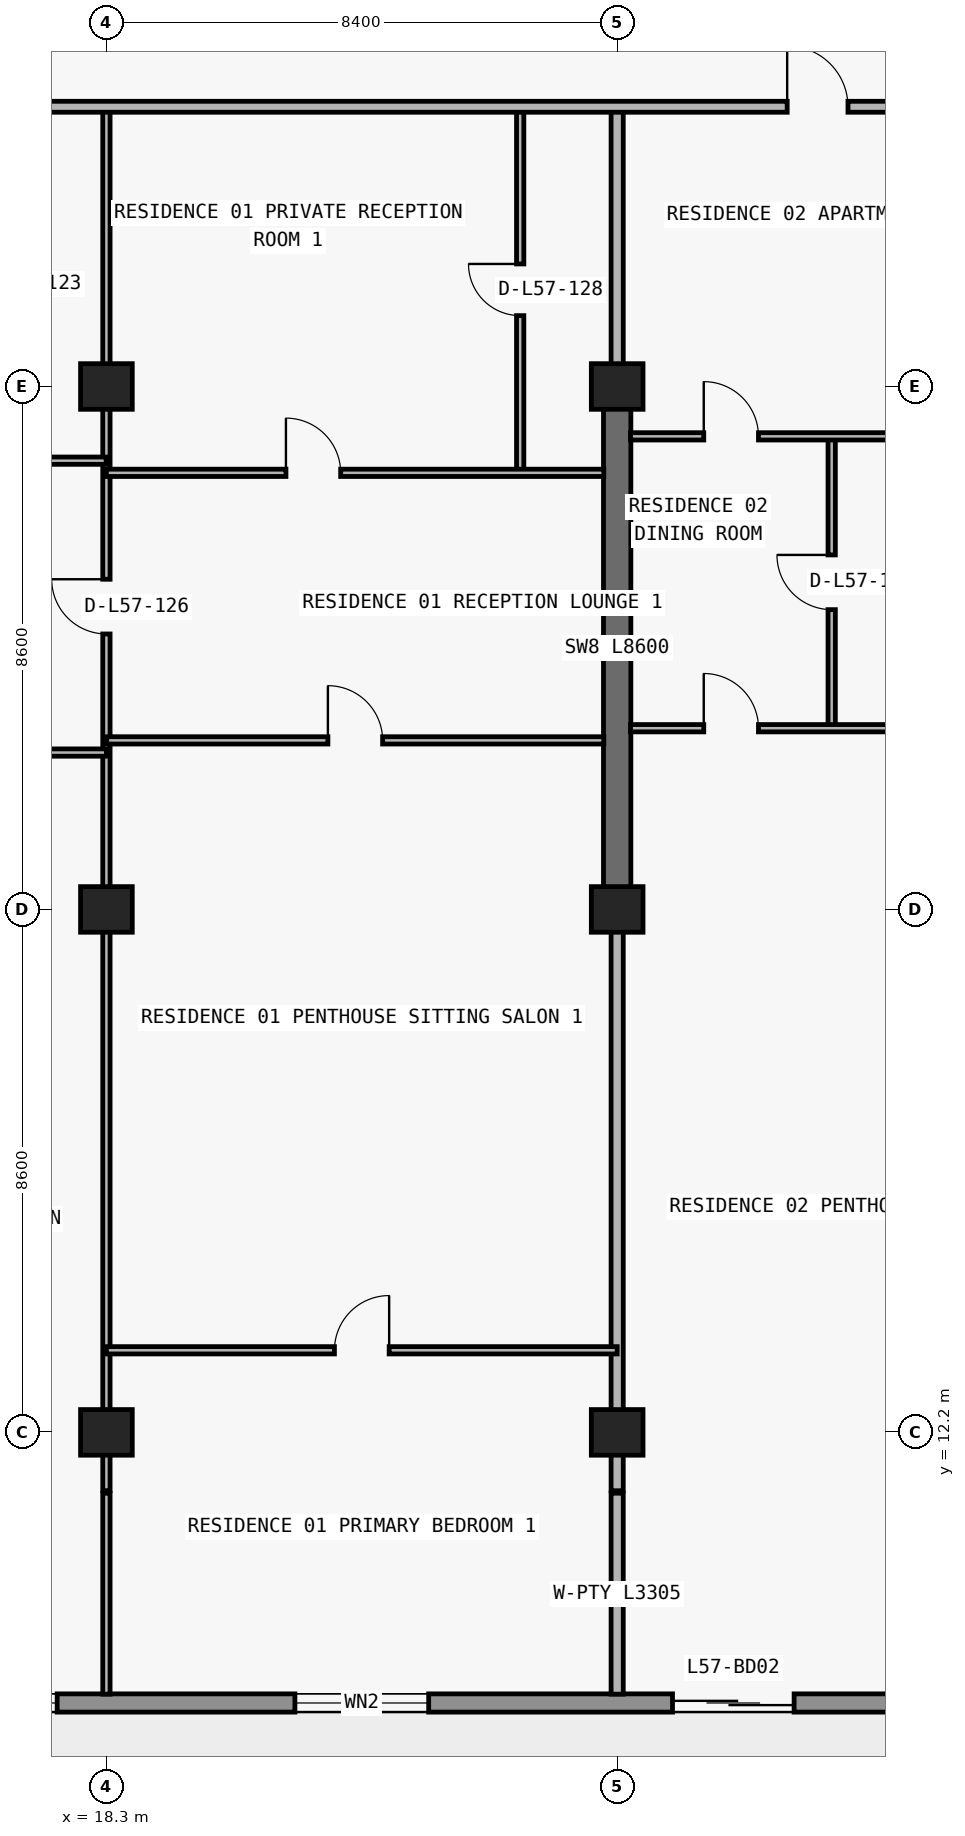
"""IFC4 building model, lengths in metres.
Left out: names, types, materials, properties, quantities, classifications, styles, units other than length and angle.
Written with IfcOpenShell. Run it as: python <this file> out.ifc"""

import sys

from ifc_helpers import new_model, si_unit, direction, frame, frame_2d, origin, origin_2d, place, context, subcontext, project, spatial, rectangle, extrude, element, fill, save


model = new_model("IFC4")
c1 = context("Model", 3, precision=1e-05, world=origin(), true_north=direction((0.0, 1.0)))
c2 = subcontext(c1, "Body", "Model", "MODEL_VIEW")
j1 = project(units=[si_unit("LENGTHUNIT", "METRE"), si_unit("PLANEANGLEUNIT", "RADIAN")], contexts=[c1])
p1 = place(None, origin())
s1 = spatial("IfcSite", under=j1, at=p1, CompositionType="ELEMENT")
p2 = place(p1, origin())
s2 = spatial("IfcBuilding", under=s1, at=p2, CompositionType="ELEMENT")
p3 = place(p2, frame((0.0, 0.0, 204.9)))
s3 = spatial("IfcBuildingStorey", under=s2, at=p3, CompositionType="ELEMENT", Elevation=204.9)
for number, where, z_axis, x_axis in (
    (1, (18.3, 12.2, 0.0), (0.0, 0.0, 1.0), (1.0, 0.0, 0.0)),
    (2, (26.7, 12.2, 0.0), (0.0, 0.0, 1.0), (1.0, 0.0, 0.0)),
    (3, (18.3, 20.8, 0.0), (0.0, 0.0, 1.0), (1.0, 0.0, 0.0)),
    (4, (26.7, 20.8, 0.0), (0.0, 0.0, 1.0), (1.0, 0.0, 0.0)),
    (5, (18.3, 29.4, 0.0), (0.0, 0.0, 1.0), (1.0, 0.0, 0.0)),
    (6, (26.7, 29.4, 0.0), (0.0, 0.0, 1.0), (1.0, 0.0, 0.0)),
):
    element("IfcColumn", number, at=place(p3, frame(where, z_axis=z_axis, x_axis=x_axis)), inside=s3, PredefinedType="COLUMN", context=c2, shape_type="SweptSolid", body=[
        extrude(rectangle(XDim=0.85, YDim=0.75, at=origin_2d()), origin(), (0.0, 0.0, 1.0), 3.05),
    ])
p4 = place(p3, frame((26.7, 20.8, 0.0), z_axis=(0.0, 0.0, 1.0), x_axis=(0.0, 1.0, 0.0)))
e7 = element("IfcWall", 7, at=p4, inside=s3, PredefinedType="SHEAR", context=c2, shape_type="SweptSolid", body=[
    extrude(rectangle(XDim=8.6, YDim=0.45, at=frame_2d((4.3, 0.0))), origin(), (0.0, 0.0, 1.0), 3.05),
])
p5 = place(p3, frame((67.7, 7.75, 0.0), z_axis=(0.0, 0.0, 1.0), x_axis=(-1.0, 0.0, 0.0)))
e8 = element("IfcWall", 8, at=p5, inside=s3, PredefinedType="STANDARD", context=c2, shape_type="SweptSolid", body=[
    extrude(rectangle(XDim=57.6, YDim=0.3, at=frame_2d((28.8, 0.0))), origin(), (0.0, 0.0, 1.0), 3.05),
])
p6 = place(p5, frame((54.69, 0.0, 0.0)))
e9 = element("IfcOpeningElement", 9, at=p6, cuts=e8, PredefinedType="OPENING", context=c2, shape_type="SweptSolid", body=[
    extrude(rectangle(XDim=2.0, YDim=2.3, at=frame_2d((1.0, 1.15))), frame((0.0, 0.16, 0.0), z_axis=(0.0, -1.0, 0.0), x_axis=(1.0, 0.0, 0.0)), (0.0, 0.0, 1.0), 0.32),
])
p7 = place(p5, frame((50.21, 0.0, 0.65)))
e10 = element("IfcOpeningElement", 10, at=p7, cuts=e8, PredefinedType="OPENING", context=c2, shape_type="SweptSolid", body=[
    extrude(rectangle(XDim=2.6, YDim=1.85, at=frame_2d((1.3, 0.925))), frame((0.0, 0.16, 0.0), z_axis=(0.0, -1.0, 0.0), x_axis=(1.0, 0.0, 0.0)), (0.0, 0.0, 1.0), 0.32),
])
p8 = place(p5, frame((44.1, 0.0, 0.85)))
e11 = element("IfcOpeningElement", 11, at=p8, cuts=e8, PredefinedType="OPENING", context=c2, shape_type="SweptSolid", body=[
    extrude(rectangle(XDim=2.2, YDim=1.55, at=frame_2d((1.1, 0.775))), frame((0.0, 0.16, 0.0), z_axis=(0.0, -1.0, 0.0), x_axis=(1.0, 0.0, 0.0)), (0.0, 0.0, 1.0), 0.32),
])
p9 = place(p5, frame((38.09, 0.0, 0.0)))
e12 = element("IfcOpeningElement", 12, at=p9, cuts=e8, PredefinedType="OPENING", context=c2, shape_type="SweptSolid", body=[
    extrude(rectangle(XDim=2.0, YDim=2.3, at=frame_2d((1.0, 1.15))), frame((0.0, 0.16, 0.0), z_axis=(0.0, -1.0, 0.0), x_axis=(1.0, 0.0, 0.0)), (0.0, 0.0, 1.0), 0.32),
])
p10 = place(p5, frame((33.41, 0.0, 0.65)))
e13 = element("IfcOpeningElement", 13, at=p10, cuts=e8, PredefinedType="OPENING", context=c2, shape_type="SweptSolid", body=[
    extrude(rectangle(XDim=2.6, YDim=1.85, at=frame_2d((1.3, 0.925))), frame((0.0, 0.16, 0.0), z_axis=(0.0, -1.0, 0.0), x_axis=(1.0, 0.0, 0.0)), (0.0, 0.0, 1.0), 0.32),
])
p11 = place(p5, frame((27.7, 0.0, 0.85)))
e14 = element("IfcOpeningElement", 14, at=p11, cuts=e8, PredefinedType="OPENING", context=c2, shape_type="SweptSolid", body=[
    extrude(rectangle(XDim=2.2, YDim=1.55, at=frame_2d((1.1, 0.775))), frame((0.0, 0.16, 0.0), z_axis=(0.0, -1.0, 0.0), x_axis=(1.0, 0.0, 0.0)), (0.0, 0.0, 1.0), 0.32),
])
p12 = place(p5, frame((19.7, 0.0, 0.85)))
e15 = element("IfcOpeningElement", 15, at=p12, cuts=e8, PredefinedType="OPENING", context=c2, shape_type="SweptSolid", body=[
    extrude(rectangle(XDim=2.2, YDim=1.55, at=frame_2d((1.1, 0.775))), frame((0.0, 0.16, 0.0), z_axis=(0.0, -1.0, 0.0), x_axis=(1.0, 0.0, 0.0)), (0.0, 0.0, 1.0), 0.32),
])
p13 = place(p5, frame((13.69, 0.0, 0.0)))
e16 = element("IfcOpeningElement", 16, at=p13, cuts=e8, PredefinedType="OPENING", context=c2, shape_type="SweptSolid", body=[
    extrude(rectangle(XDim=2.0, YDim=2.3, at=frame_2d((1.0, 1.15))), frame((0.0, 0.16, 0.0), z_axis=(0.0, -1.0, 0.0), x_axis=(1.0, 0.0, 0.0)), (0.0, 0.0, 1.0), 0.32),
])
p14 = place(p5, frame((9.01, 0.0, 0.65)))
e17 = element("IfcOpeningElement", 17, at=p14, cuts=e8, PredefinedType="OPENING", context=c2, shape_type="SweptSolid", body=[
    extrude(rectangle(XDim=2.6, YDim=1.85, at=frame_2d((1.3, 0.925))), frame((0.0, 0.16, 0.0), z_axis=(0.0, -1.0, 0.0), x_axis=(1.0, 0.0, 0.0)), (0.0, 0.0, 1.0), 0.32),
])
p15 = place(p5, frame((3.0, 0.0, 0.85)))
e18 = element("IfcOpeningElement", 18, at=p15, cuts=e8, PredefinedType="OPENING", context=c2, shape_type="SweptSolid", body=[
    extrude(rectangle(XDim=2.2, YDim=1.55, at=frame_2d((1.1, 0.775))), frame((0.0, 0.16, 0.0), z_axis=(0.0, -1.0, 0.0), x_axis=(1.0, 0.0, 0.0)), (0.0, 0.0, 1.0), 0.32),
])
p16 = place(p3, frame((18.3, 7.895, 0.0), z_axis=(0.0, 0.0, 1.0), x_axis=(0.0, 1.0, 0.0)))
e19 = element("IfcWall", 19, at=p16, inside=s3, PredefinedType="PARTITIONING", context=c2, shape_type="SweptSolid", body=[
    extrude(rectangle(XDim=3.305, YDim=0.12, at=frame_2d((1.652, 0.0))), origin(), (0.0, 0.0, 1.0), 3.05),
])
p17 = place(p3, frame((18.3, 11.24, 0.0), z_axis=(0.0, 0.0, 1.0), x_axis=(0.0, 1.0, 0.0)))
e20 = element("IfcWall", 20, at=p17, inside=s3, PredefinedType="PARTITIONING", context=c2, shape_type="SweptSolid", body=[
    extrude(rectangle(XDim=22.76, YDim=0.12, at=frame_2d((11.38, 0.0))), origin(), (0.0, 0.0, 1.0), 2.263),
])
p18 = place(p17, frame((14.09, 0.0, 0.0)))
e21 = element("IfcOpeningElement", 21, at=p18, cuts=e20, PredefinedType="OPENING", context=c2, shape_type="SweptSolid", body=[
    extrude(rectangle(XDim=0.9, YDim=2.15, at=frame_2d((0.45, 1.075))), frame((0.0, 0.07, 0.0), z_axis=(0.0, -1.0, 0.0), x_axis=(1.0, 0.0, 0.0)), (0.0, 0.0, 1.0), 0.14),
])
p19 = place(p3, frame((25.105, 27.98, 0.0), z_axis=(0.0, 0.0, 1.0), x_axis=(0.0, 1.0, 0.0)))
e22 = element("IfcWall", 22, at=p19, inside=s3, PredefinedType="PARTITIONING", context=c2, shape_type="SweptSolid", body=[
    extrude(rectangle(XDim=6.02, YDim=0.12, at=frame_2d((3.01, 0.0))), origin(), (0.0, 0.0, 1.0), 3.05),
])
p20 = place(p19, frame((2.585, 0.0, 0.0)))
e23 = element("IfcOpeningElement", 23, at=p20, cuts=e22, PredefinedType="OPENING", context=c2, shape_type="SweptSolid", body=[
    extrude(rectangle(XDim=0.85, YDim=2.1, at=frame_2d((0.425, 1.05))), frame((0.0, 0.07, 0.0), z_axis=(0.0, -1.0, 0.0), x_axis=(1.0, 0.0, 0.0)), (0.0, 0.0, 1.0), 0.14),
])
p21 = place(p3, frame((26.7, 7.895, 0.0), z_axis=(0.0, 0.0, 1.0), x_axis=(0.0, 1.0, 0.0)))
e24 = element("IfcWall", 24, at=p21, inside=s3, PredefinedType="PARTITIONING", context=c2, shape_type="SweptSolid", body=[
    extrude(rectangle(XDim=3.305, YDim=0.2, at=frame_2d((1.652, 0.0))), origin(), (0.0, 0.0, 1.0), 3.05),
])
p22 = place(p3, frame((26.7, 11.24, 0.0), z_axis=(0.0, 0.0, 1.0), x_axis=(0.0, 1.0, 0.0)))
e25 = element("IfcWall", 25, at=p22, inside=s3, PredefinedType="PARTITIONING", context=c2, shape_type="SweptSolid", body=[
    extrude(rectangle(XDim=9.555, YDim=0.2, at=frame_2d((4.777, 0.0))), origin(), (0.0, 0.0, 1.0), 2.263),
])
p23 = place(p3, frame((26.7, 29.405, 0.0), z_axis=(0.0, 0.0, 1.0), x_axis=(0.0, 1.0, 0.0)))
e26 = element("IfcWall", 26, at=p23, inside=s3, PredefinedType="PARTITIONING", context=c2, shape_type="SweptSolid", body=[
    extrude(rectangle(XDim=4.595, YDim=0.2, at=frame_2d((2.297, 0.0))), origin(), (0.0, 0.0, 1.0), 2.335),
])
p24 = place(p3, frame((30.228, 23.78, 0.0), z_axis=(0.0, 0.0, 1.0), x_axis=(0.0, 1.0, 0.0)))
e27 = element("IfcWall", 27, at=p24, inside=s3, PredefinedType="PARTITIONING", context=c2, shape_type="SweptSolid", body=[
    extrude(rectangle(XDim=4.8, YDim=0.12, at=frame_2d((2.4, 0.0))), origin(), (0.0, 0.0, 1.0), 3.05),
])
p25 = place(p24, frame((1.95, 0.0, 0.0)))
e28 = element("IfcOpeningElement", 28, at=p25, cuts=e27, PredefinedType="OPENING", context=c2, shape_type="SweptSolid", body=[
    extrude(rectangle(XDim=0.9, YDim=2.15, at=frame_2d((0.45, 1.075))), frame((0.0, 0.07, 0.0), z_axis=(0.0, -1.0, 0.0), x_axis=(1.0, 0.0, 0.0)), (0.0, 0.0, 1.0), 0.14),
])
p26 = place(p3, frame((18.3, 13.55, 0.0), z_axis=(0.0, 0.0, 1.0), x_axis=(1.0, 0.0, 0.0)))
e29 = element("IfcWall", 29, at=p26, inside=s3, PredefinedType="PARTITIONING", context=c2, shape_type="SweptSolid", body=[
    extrude(rectangle(XDim=8.4, YDim=0.12, at=frame_2d((4.2, 0.0))), origin(), (0.0, 0.0, 1.0), 3.05),
])
p27 = place(p26, frame((3.75, 0.0, 0.0)))
e30 = element("IfcOpeningElement", 30, at=p27, cuts=e29, PredefinedType="OPENING", context=c2, shape_type="SweptSolid", body=[
    extrude(rectangle(XDim=0.9, YDim=2.15, at=frame_2d((0.45, 1.075))), frame((0.0, 0.07, 0.0), z_axis=(0.0, -1.0, 0.0), x_axis=(1.0, 0.0, 0.0)), (0.0, 0.0, 1.0), 0.14),
])
p28 = place(p3, frame((10.1, 23.38, 0.0), z_axis=(0.0, 0.0, 1.0), x_axis=(1.0, 0.0, 0.0)))
e31 = element("IfcWall", 31, at=p28, inside=s3, PredefinedType="PARTITIONING", context=c2, shape_type="SweptSolid", body=[
    extrude(rectangle(XDim=8.2, YDim=0.12, at=frame_2d((4.1, 0.0))), origin(), (0.0, 0.0, 1.0), 3.05),
])
p29 = place(p28, frame((3.65, 0.0, 0.0)))
e32 = element("IfcOpeningElement", 32, at=p29, cuts=e31, PredefinedType="OPENING", context=c2, shape_type="SweptSolid", body=[
    extrude(rectangle(XDim=0.9, YDim=2.15, at=frame_2d((0.45, 1.075))), frame((0.0, 0.07, 0.0), z_axis=(0.0, -1.0, 0.0), x_axis=(1.0, 0.0, 0.0)), (0.0, 0.0, 1.0), 0.14),
])
p30 = place(p3, frame((18.305, 23.58, 0.0), z_axis=(0.0, 0.0, 1.0), x_axis=(1.0, 0.0, 0.0)))
e33 = element("IfcWall", 33, at=p30, inside=s3, PredefinedType="PARTITIONING", context=c2, shape_type="SweptSolid", body=[
    extrude(rectangle(XDim=8.175, YDim=0.12, at=frame_2d((4.087, 0.0))), origin(), (0.0, 0.0, 1.0), 3.05),
])
p31 = place(p30, frame((3.637, 0.0, 0.0)))
e34 = element("IfcOpeningElement", 34, at=p31, cuts=e33, PredefinedType="OPENING", context=c2, shape_type="SweptSolid", body=[
    extrude(rectangle(XDim=0.9, YDim=2.15, at=frame_2d((0.45, 1.075))), frame((0.0, 0.07, 0.0), z_axis=(0.0, -1.0, 0.0), x_axis=(1.0, 0.0, 0.0)), (0.0, 0.0, 1.0), 0.14),
])
p32 = place(p3, frame((26.92, 23.78, 0.0), z_axis=(0.0, 0.0, 1.0), x_axis=(1.0, 0.0, 0.0)))
e35 = element("IfcWall", 35, at=p32, inside=s3, PredefinedType="PARTITIONING", context=c2, shape_type="SweptSolid", body=[
    extrude(rectangle(XDim=8.18, YDim=0.12, at=frame_2d((4.09, 0.0))), origin(), (0.0, 0.0, 1.0), 3.05),
])
p33 = place(p32, frame((1.204, 0.0, 0.0)))
e36 = element("IfcOpeningElement", 36, at=p33, cuts=e35, PredefinedType="OPENING", context=c2, shape_type="SweptSolid", body=[
    extrude(rectangle(XDim=0.9, YDim=2.15, at=frame_2d((0.45, 1.075))), frame((0.0, 0.07, 0.0), z_axis=(0.0, -1.0, 0.0), x_axis=(1.0, 0.0, 0.0)), (0.0, 0.0, 1.0), 0.14),
])
p34 = place(p3, frame((18.3, 27.98, 0.0), z_axis=(0.0, 0.0, 1.0), x_axis=(1.0, 0.0, 0.0)))
e37 = element("IfcWall", 37, at=p34, inside=s3, PredefinedType="PARTITIONING", context=c2, shape_type="SweptSolid", body=[
    extrude(rectangle(XDim=8.18, YDim=0.12, at=frame_2d((4.09, 0.0))), origin(), (0.0, 0.0, 1.0), 3.05),
])
p35 = place(p34, frame((2.952, 0.0, 0.0)))
e38 = element("IfcOpeningElement", 38, at=p35, cuts=e37, PredefinedType="OPENING", context=c2, shape_type="SweptSolid", body=[
    extrude(rectangle(XDim=0.9, YDim=2.15, at=frame_2d((0.45, 1.075))), frame((0.0, 0.07, 0.0), z_axis=(0.0, -1.0, 0.0), x_axis=(1.0, 0.0, 0.0)), (0.0, 0.0, 1.0), 0.14),
])
p36 = place(p3, frame((10.1, 28.18, 0.0), z_axis=(0.0, 0.0, 1.0), x_axis=(1.0, 0.0, 0.0)))
e39 = element("IfcWall", 39, at=p36, inside=s3, PredefinedType="PARTITIONING", context=c2, shape_type="SweptSolid", body=[
    extrude(rectangle(XDim=8.195, YDim=0.12, at=frame_2d((4.097, 0.0))), origin(), (0.0, 0.0, 1.0), 3.05),
])
p37 = place(p36, frame((2.765, 0.0, 0.0)))
e40 = element("IfcOpeningElement", 40, at=p37, cuts=e39, PredefinedType="OPENING", context=c2, shape_type="SweptSolid", body=[
    extrude(rectangle(XDim=0.9, YDim=2.15, at=frame_2d((0.45, 1.075))), frame((0.0, 0.07, 0.0), z_axis=(0.0, -1.0, 0.0), x_axis=(1.0, 0.0, 0.0)), (0.0, 0.0, 1.0), 0.14),
])
p38 = place(p3, frame((26.92, 28.58, 0.0), z_axis=(0.0, 0.0, 1.0), x_axis=(1.0, 0.0, 0.0)))
e41 = element("IfcWall", 41, at=p38, inside=s3, PredefinedType="PARTITIONING", context=c2, shape_type="SweptSolid", body=[
    extrude(rectangle(XDim=8.175, YDim=0.12, at=frame_2d((4.087, 0.0))), origin(), (0.0, 0.0, 1.0), 3.05),
])
p39 = place(p38, frame((1.204, 0.0, 0.0)))
e42 = element("IfcOpeningElement", 42, at=p39, cuts=e41, PredefinedType="OPENING", context=c2, shape_type="SweptSolid", body=[
    extrude(rectangle(XDim=0.9, YDim=2.15, at=frame_2d((0.45, 1.075))), frame((0.0, 0.07, 0.0), z_axis=(0.0, -1.0, 0.0), x_axis=(1.0, 0.0, 0.0)), (0.0, 0.0, 1.0), 0.14),
])
p40 = place(p3, frame((10.105, 34.0, 0.0), z_axis=(0.0, 0.0, 1.0), x_axis=(1.0, 0.0, 0.0)))
e43 = element("IfcWall", 43, at=p40, inside=s3, PredefinedType="PARTITIONING", context=c2, shape_type="SweptSolid", body=[
    extrude(rectangle(XDim=57.595, YDim=0.18, at=frame_2d((28.797, 0.0))), origin(), (0.0, 0.0, 1.0), 3.05),
])
p41 = place(p40, frame((2.712, 0.0, 0.0)))
e44 = element("IfcOpeningElement", 44, at=p41, cuts=e43, PredefinedType="OPENING", context=c2, shape_type="SweptSolid", body=[
    extrude(rectangle(XDim=1.0, YDim=2.2, at=frame_2d((0.5, 1.1))), frame((0.0, 0.1, 0.0), z_axis=(0.0, -1.0, 0.0), x_axis=(1.0, 0.0, 0.0)), (0.0, 0.0, 1.0), 0.2),
])
p42 = place(p40, frame((19.391, 0.0, 0.0)))
e45 = element("IfcOpeningElement", 45, at=p42, cuts=e43, PredefinedType="OPENING", context=c2, shape_type="SweptSolid", body=[
    extrude(rectangle(XDim=1.0, YDim=2.2, at=frame_2d((0.5, 1.1))), frame((0.0, 0.1, 0.0), z_axis=(0.0, -1.0, 0.0), x_axis=(1.0, 0.0, 0.0)), (0.0, 0.0, 1.0), 0.2),
])
p43 = place(p40, frame((43.794, 0.0, 0.0)))
e46 = element("IfcOpeningElement", 46, at=p43, cuts=e43, PredefinedType="OPENING", context=c2, shape_type="SweptSolid", body=[
    extrude(rectangle(XDim=1.0, YDim=2.2, at=frame_2d((0.5, 1.1))), frame((0.0, 0.1, 0.0), z_axis=(0.0, -1.0, 0.0), x_axis=(1.0, 0.0, 0.0)), (0.0, 0.0, 1.0), 0.2),
])
p44 = place(p7, origin())
e47 = element("IfcWindow", 47, at=p44, inside=s3, PartitioningType="SINGLE_PANEL", PredefinedType="WINDOW", context=c2, shape_type="SweptSolid", body=[
    extrude(rectangle(XDim=2.6, YDim=1.85, at=frame_2d((1.3, 0.925))), frame((0.0, 0.03, 0.0), z_axis=(0.0, -1.0, 0.0), x_axis=(1.0, 0.0, 0.0)), (0.0, 0.0, 1.0), 0.06),
])
fill(e10, e47)
p45 = place(p8, origin())
e48 = element("IfcWindow", 48, at=p45, inside=s3, PartitioningType="SINGLE_PANEL", PredefinedType="WINDOW", context=c2, shape_type="SweptSolid", body=[
    extrude(rectangle(XDim=2.2, YDim=1.55, at=frame_2d((1.1, 0.775))), frame((0.0, 0.03, 0.0), z_axis=(0.0, -1.0, 0.0), x_axis=(1.0, 0.0, 0.0)), (0.0, 0.0, 1.0), 0.06),
])
fill(e11, e48)
p46 = place(p9, origin())
e49 = element("IfcDoor", 49, at=p46, inside=s3, OperationType="DOUBLE_DOOR_SLIDING", PredefinedType="DOOR", context=c2, shape_type="SweptSolid", body=[
    extrude(rectangle(XDim=2.0, YDim=2.3, at=frame_2d((1.0, 1.15))), frame((0.0, 0.025, 0.0), z_axis=(0.0, -1.0, 0.0), x_axis=(1.0, 0.0, 0.0)), (0.0, 0.0, 1.0), 0.05),
])
fill(e12, e49)
p47 = place(p18, origin())
e50 = element("IfcDoor", 50, at=p47, inside=s3, OperationType="SINGLE_SWING_RIGHT", PredefinedType="DOOR", context=c2, shape_type="SweptSolid", body=[
    extrude(rectangle(XDim=0.9, YDim=2.15, at=frame_2d((0.45, 1.075))), frame((0.0, 0.025, 0.0), z_axis=(0.0, -1.0, 0.0), x_axis=(1.0, 0.0, 0.0)), (0.0, 0.0, 1.0), 0.05),
])
fill(e21, e50)
p48 = place(p35, origin())
e51 = element("IfcDoor", 51, at=p48, inside=s3, OperationType="SINGLE_SWING_LEFT", PredefinedType="DOOR", context=c2, shape_type="SweptSolid", body=[
    extrude(rectangle(XDim=0.9, YDim=2.15, at=frame_2d((0.45, 1.075))), frame((0.0, 0.025, 0.0), z_axis=(0.0, -1.0, 0.0), x_axis=(1.0, 0.0, 0.0)), (0.0, 0.0, 1.0), 0.05),
])
fill(e38, e51)
p49 = place(p20, origin())
e52 = element("IfcDoor", 52, at=p49, inside=s3, OperationType="SINGLE_SWING_RIGHT", PredefinedType="DOOR", context=c2, shape_type="SweptSolid", body=[
    extrude(rectangle(XDim=0.85, YDim=2.1, at=frame_2d((0.425, 1.05))), frame((0.0, 0.025, 0.0), z_axis=(0.0, -1.0, 0.0), x_axis=(1.0, 0.0, 0.0)), (0.0, 0.0, 1.0), 0.05),
])
fill(e23, e52)
p50 = place(p31, origin())
e53 = element("IfcDoor", 53, at=p50, inside=s3, OperationType="SINGLE_SWING_LEFT", PredefinedType="DOOR", context=c2, shape_type="SweptSolid", body=[
    extrude(rectangle(XDim=0.9, YDim=2.15, at=frame_2d((0.45, 1.075))), frame((0.0, 0.025, 0.0), z_axis=(0.0, -1.0, 0.0), x_axis=(1.0, 0.0, 0.0)), (0.0, 0.0, 1.0), 0.05),
])
fill(e34, e53)
p51 = place(p27, origin())
e54 = element("IfcDoor", 54, at=p51, inside=s3, OperationType="SINGLE_SWING_RIGHT", PredefinedType="DOOR", context=c2, shape_type="SweptSolid", body=[
    extrude(rectangle(XDim=0.9, YDim=2.15, at=frame_2d((0.45, 1.075))), frame((0.0, 0.025, 0.0), z_axis=(0.0, -1.0, 0.0), x_axis=(1.0, 0.0, 0.0)), (0.0, 0.0, 1.0), 0.05),
])
fill(e30, e54)
p52 = place(p42, origin())
e55 = element("IfcDoor", 55, at=p52, inside=s3, OperationType="SINGLE_SWING_LEFT", PredefinedType="DOOR", context=c2, shape_type="SweptSolid", body=[
    extrude(rectangle(XDim=1.0, YDim=2.2, at=frame_2d((0.5, 1.1))), frame((0.0, 0.025, 0.0), z_axis=(0.0, -1.0, 0.0), x_axis=(1.0, 0.0, 0.0)), (0.0, 0.0, 1.0), 0.05),
])
fill(e45, e55)
p53 = place(p39, origin())
e56 = element("IfcDoor", 56, at=p53, inside=s3, OperationType="SINGLE_SWING_LEFT", PredefinedType="DOOR", context=c2, shape_type="SweptSolid", body=[
    extrude(rectangle(XDim=0.9, YDim=2.15, at=frame_2d((0.45, 1.075))), frame((0.0, 0.025, 0.0), z_axis=(0.0, -1.0, 0.0), x_axis=(1.0, 0.0, 0.0)), (0.0, 0.0, 1.0), 0.05),
])
fill(e42, e56)
p54 = place(p25, origin())
e57 = element("IfcDoor", 57, at=p54, inside=s3, OperationType="SINGLE_SWING_RIGHT", PredefinedType="DOOR", context=c2, shape_type="SweptSolid", body=[
    extrude(rectangle(XDim=0.9, YDim=2.15, at=frame_2d((0.45, 1.075))), frame((0.0, 0.025, 0.0), z_axis=(0.0, -1.0, 0.0), x_axis=(1.0, 0.0, 0.0)), (0.0, 0.0, 1.0), 0.05),
])
fill(e28, e57)
p55 = place(p33, origin())
e58 = element("IfcDoor", 58, at=p55, inside=s3, OperationType="SINGLE_SWING_LEFT", PredefinedType="DOOR", context=c2, shape_type="SweptSolid", body=[
    extrude(rectangle(XDim=0.9, YDim=2.15, at=frame_2d((0.45, 1.075))), frame((0.0, 0.025, 0.0), z_axis=(0.0, -1.0, 0.0), x_axis=(1.0, 0.0, 0.0)), (0.0, 0.0, 1.0), 0.05),
])
fill(e36, e58)
save(model, sys.argv[1])
